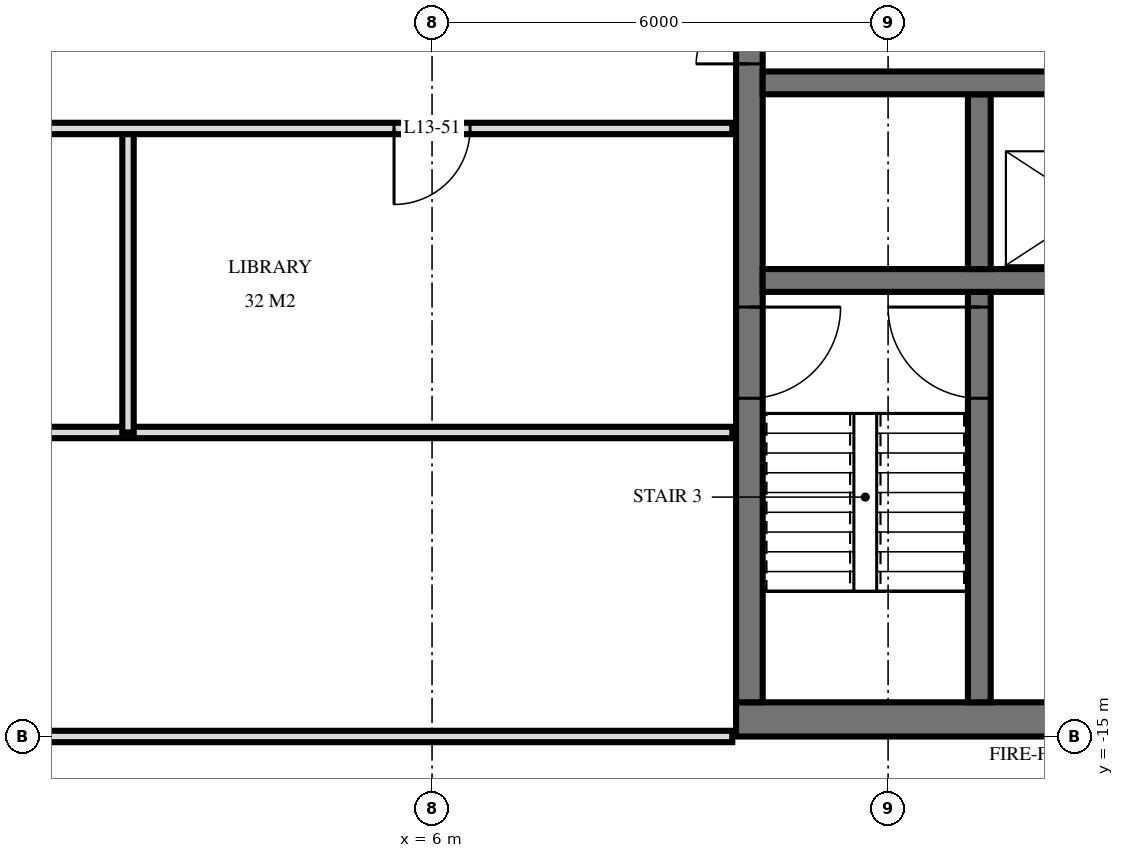
"""IFC4 building model, lengths in metres.
Left out: names, types, materials, properties, quantities, classifications, styles, units other than length and angle.
Written with IfcOpenShell. Run it as: python <this file> out.ifc"""

import sys

from ifc_helpers import new_model, si_unit, direction, frame, frame_2d, origin, place, context, subcontext, project, spatial, rectangle, extrude, element, fill, save


model = new_model("IFC4")
c1 = context("Model", 3, precision=1e-05, world=origin(), true_north=direction((0.0, 1.0)))
c2 = subcontext(c1, "Body", "Model", "MODEL_VIEW")
j1 = project(units=[si_unit("LENGTHUNIT", "METRE"), si_unit("PLANEANGLEUNIT", "RADIAN")], contexts=[c1])
p1 = place(None, origin())
s1 = spatial("IfcSite", under=j1, at=p1, CompositionType="ELEMENT")
p2 = place(p1, origin())
s2 = spatial("IfcBuilding", under=s1, at=p2, CompositionType="ELEMENT")
p3 = place(p2, frame((0.0, 0.0, 56.4)))
s3 = spatial("IfcBuildingStorey", under=s2, at=p3, CompositionType="ELEMENT", Elevation=56.4)
p4 = place(p3, frame((10.0, -14.775, 0.0), z_axis=(0.0, 0.0, 1.0), x_axis=(1.0, 0.0, 0.0)))
e1 = element("IfcWall", 1, at=p4, inside=s3, PredefinedType="SHEAR", context=c2, shape_type="SweptSolid", body=[
    extrude(rectangle(XDim=19.5, YDim=0.45, at=frame_2d((9.75, 0.0))), origin(), (0.0, 0.0, 1.0), 3.6),
])
p5 = place(p4, frame((7.1, 0.0, 0.0)))
e2 = element("IfcOpeningElement", 2, at=p5, cuts=e1, PredefinedType="OPENING", context=c2, shape_type="SweptSolid", body=[
    extrude(rectangle(XDim=1.2, YDim=2.1, at=frame_2d((0.6, 1.05))), frame((0.0, 0.235, 0.0), z_axis=(0.0, -1.0, 0.0), x_axis=(1.0, 0.0, 0.0)), (0.0, 0.0, 1.0), 0.47),
])
p6 = place(p4, frame((4.15, 0.0, 0.0)))
e3 = element("IfcOpeningElement", 3, at=p6, cuts=e1, PredefinedType="OPENING", context=c2, shape_type="SweptSolid", body=[
    extrude(rectangle(XDim=1.1, YDim=2.1, at=frame_2d((0.55, 1.05))), frame((0.0, 0.235, 0.0), z_axis=(0.0, -1.0, 0.0), x_axis=(1.0, 0.0, 0.0)), (0.0, 0.0, 1.0), 0.47),
])
p7 = place(p4, frame((10.1, 0.0, 0.0)))
e4 = element("IfcOpeningElement", 4, at=p7, cuts=e1, PredefinedType="OPENING", context=c2, shape_type="SweptSolid", body=[
    extrude(rectangle(XDim=0.9, YDim=2.1, at=frame_2d((0.45, 1.05))), frame((0.0, 0.235, 0.0), z_axis=(0.0, -1.0, 0.0), x_axis=(1.0, 0.0, 0.0)), (0.0, 0.0, 1.0), 0.47),
])
p8 = place(p4, frame((12.45, 0.0, 0.0)))
e5 = element("IfcOpeningElement", 5, at=p8, cuts=e1, PredefinedType="OPENING", context=c2, shape_type="SweptSolid", body=[
    extrude(rectangle(XDim=1.0, YDim=2.1, at=frame_2d((0.5, 1.05))), frame((0.0, 0.235, 0.0), z_axis=(0.0, -1.0, 0.0), x_axis=(1.0, 0.0, 0.0)), (0.0, 0.0, 1.0), 0.47),
])
p9 = place(p4, frame((15.087, 0.0, 0.0)))
e6 = element("IfcOpeningElement", 6, at=p9, cuts=e1, PredefinedType="OPENING", context=c2, shape_type="SweptSolid", body=[
    extrude(rectangle(XDim=1.0, YDim=2.1, at=frame_2d((0.5, 1.05))), frame((0.0, 0.235, 0.0), z_axis=(0.0, -1.0, 0.0), x_axis=(1.0, 0.0, 0.0)), (0.0, 0.0, 1.0), 0.47),
])
p10 = place(p4, frame((17.413, 0.0, 0.0)))
e7 = element("IfcOpeningElement", 7, at=p10, cuts=e1, PredefinedType="OPENING", context=c2, shape_type="SweptSolid", body=[
    extrude(rectangle(XDim=1.0, YDim=2.1, at=frame_2d((0.5, 1.05))), frame((0.0, 0.235, 0.0), z_axis=(0.0, -1.0, 0.0), x_axis=(1.0, 0.0, 0.0)), (0.0, 0.0, 1.0), 0.47),
])
p11 = place(p3, frame((10.175, -14.55, 0.0), z_axis=(0.0, 0.0, 1.0), x_axis=(0.0, 1.0, 0.0)))
e8 = element("IfcWall", 8, at=p11, inside=s3, PredefinedType="SHEAR", context=c2, shape_type="SweptSolid", body=[
    extrude(rectangle(XDim=14.1, YDim=0.35, at=frame_2d((7.05, 0.0))), origin(), (0.0, 0.0, 1.0), 3.6),
])
p12 = place(p11, frame((8.4, 0.0, 0.0)))
e9 = element("IfcOpeningElement", 9, at=p12, cuts=e8, PredefinedType="OPENING", context=c2, shape_type="SweptSolid", body=[
    extrude(rectangle(XDim=1.4, YDim=2.4, at=frame_2d((0.7, 1.2))), frame((0.0, 0.185, 0.0), z_axis=(0.0, -1.0, 0.0), x_axis=(1.0, 0.0, 0.0)), (0.0, 0.0, 1.0), 0.37),
])
p13 = place(p11, frame((10.0, 0.0, 0.0)))
e10 = element("IfcOpeningElement", 10, at=p13, cuts=e8, PredefinedType="OPENING", context=c2, shape_type="SweptSolid", body=[
    extrude(rectangle(XDim=1.4, YDim=2.4, at=frame_2d((0.7, 1.2))), frame((0.0, 0.185, 0.0), z_axis=(0.0, -1.0, 0.0), x_axis=(1.0, 0.0, 0.0)), (0.0, 0.0, 1.0), 0.37),
])
p14 = place(p11, frame((4.0, 0.0, 0.0)))
e11 = element("IfcOpeningElement", 11, at=p14, cuts=e8, PredefinedType="OPENING", context=c2, shape_type="SweptSolid", body=[
    extrude(rectangle(XDim=1.2, YDim=2.1, at=frame_2d((0.6, 1.05))), frame((0.0, 0.185, 0.0), z_axis=(0.0, -1.0, 0.0), x_axis=(1.0, 0.0, 0.0)), (0.0, 0.0, 1.0), 0.37),
])
p15 = place(p3, frame((10.35, -6.4, 0.0), z_axis=(0.0, 0.0, 1.0), x_axis=(1.0, 0.0, 0.0)))
e12 = element("IfcWall", 12, at=p15, inside=s3, PredefinedType="SHEAR", context=c2, shape_type="SweptSolid", body=[
    extrude(rectangle(XDim=18.7, YDim=0.3, at=frame_2d((9.35, 0.0))), origin(), (0.0, 0.0, 1.0), 3.6),
])
p16 = place(p15, frame((14.65, 0.0, 0.0)))
e13 = element("IfcOpeningElement", 13, at=p16, cuts=e12, PredefinedType="OPENING", context=c2, shape_type="SweptSolid", body=[
    extrude(rectangle(XDim=1.1, YDim=2.1, at=frame_2d((0.55, 1.05))), frame((0.0, 0.16, 0.0), z_axis=(0.0, -1.0, 0.0), x_axis=(1.0, 0.0, 0.0)), (0.0, 0.0, 1.0), 0.32),
])
p17 = place(p15, frame((17.05, 0.0, 0.0)))
e14 = element("IfcOpeningElement", 14, at=p17, cuts=e12, PredefinedType="OPENING", context=c2, shape_type="SweptSolid", body=[
    extrude(rectangle(XDim=1.1, YDim=2.1, at=frame_2d((0.55, 1.05))), frame((0.0, 0.16, 0.0), z_axis=(0.0, -1.0, 0.0), x_axis=(1.0, 0.0, 0.0)), (0.0, 0.0, 1.0), 0.32),
])
p18 = place(p15, frame((6.8, 0.0, 0.0)))
e15 = element("IfcOpeningElement", 15, at=p18, cuts=e12, PredefinedType="OPENING", context=c2, shape_type="SweptSolid", body=[
    extrude(rectangle(XDim=1.1, YDim=2.1, at=frame_2d((0.55, 1.05))), frame((0.0, 0.16, 0.0), z_axis=(0.0, -1.0, 0.0), x_axis=(1.0, 0.0, 0.0)), (0.0, 0.0, 1.0), 0.32),
])
p19 = place(p15, frame((12.1, 0.0, 0.0)))
e16 = element("IfcOpeningElement", 16, at=p19, cuts=e12, PredefinedType="OPENING", context=c2, shape_type="SweptSolid", body=[
    extrude(rectangle(XDim=1.0, YDim=2.1, at=frame_2d((0.5, 1.05))), frame((0.0, 0.16, 0.0), z_axis=(0.0, -1.0, 0.0), x_axis=(1.0, 0.0, 0.0)), (0.0, 0.0, 1.0), 0.32),
])
p20 = place(p3, frame((10.35, -9.0, 0.0), z_axis=(0.0, 0.0, 1.0), x_axis=(1.0, 0.0, 0.0)))
e17 = element("IfcWall", 17, at=p20, inside=s3, PredefinedType="SHEAR", context=c2, shape_type="SweptSolid", body=[
    extrude(rectangle(XDim=18.7, YDim=0.3, at=frame_2d((9.35, 0.0))), origin(), (0.0, 0.0, 1.0), 3.6),
])
p21 = place(p20, frame((3.8, 0.0, 0.0)))
e18 = element("IfcOpeningElement", 18, at=p21, cuts=e17, PredefinedType="OPENING", context=c2, shape_type="SweptSolid", body=[
    extrude(rectangle(XDim=1.1, YDim=2.1, at=frame_2d((0.55, 1.05))), frame((0.0, 0.16, 0.0), z_axis=(0.0, -1.0, 0.0), x_axis=(1.0, 0.0, 0.0)), (0.0, 0.0, 1.0), 0.32),
])
p22 = place(p3, frame((13.2, -8.85, 0.0), z_axis=(0.0, 0.0, 1.0), x_axis=(0.0, 1.0, 0.0)))
e19 = element("IfcWall", 19, at=p22, inside=s3, PredefinedType="SHEAR", context=c2, shape_type="SweptSolid", body=[
    extrude(rectangle(XDim=2.3, YDim=0.3, at=frame_2d((1.15, 0.0))), origin(), (0.0, 0.0, 1.0), 3.6),
])
p23 = place(p3, frame((13.2, -14.55, 0.0), z_axis=(0.0, 0.0, 1.0), x_axis=(0.0, 1.0, 0.0)))
e20 = element("IfcWall", 20, at=p23, inside=s3, PredefinedType="SHEAR", context=c2, shape_type="SweptSolid", body=[
    extrude(rectangle(XDim=5.4, YDim=0.3, at=frame_2d((2.7, 0.0))), origin(), (0.0, 0.0, 1.0), 3.6),
])
p24 = place(p23, frame((4.0, 0.0, 0.0)))
e21 = element("IfcOpeningElement", 21, at=p24, cuts=e20, PredefinedType="OPENING", context=c2, shape_type="SweptSolid", body=[
    extrude(rectangle(XDim=1.2, YDim=2.1, at=frame_2d((0.6, 1.05))), frame((0.0, 0.16, 0.0), z_axis=(0.0, -1.0, 0.0), x_axis=(1.0, 0.0, 0.0)), (0.0, 0.0, 1.0), 0.32),
])
p25 = place(p3, frame((2.0, -11.0, 0.0), z_axis=(0.0, 0.0, 1.0), x_axis=(0.0, 1.0, 0.0)))
e22 = element("IfcWall", 22, at=p25, inside=s3, PredefinedType="PARTITIONING", context=c2, shape_type="SweptSolid", body=[
    extrude(rectangle(XDim=4.0, YDim=0.15, at=frame_2d((2.0, 0.0))), origin(), (0.0, 0.0, 1.0), 3.32),
])
p26 = place(p3, frame((-9.95, -15.0, 0.0), z_axis=(0.0, 0.0, 1.0), x_axis=(1.0, 0.0, 0.0)))
e23 = element("IfcWall", 23, at=p26, inside=s3, PredefinedType="PARTITIONING", context=c2, shape_type="SweptSolid", body=[
    extrude(rectangle(XDim=19.9, YDim=0.15, at=frame_2d((9.95, 0.0))), origin(), (0.0, 0.0, 1.0), 2.684),
])
p27 = place(p26, frame((9.45, 0.0, 0.0)))
e24 = element("IfcOpeningElement", 24, at=p27, cuts=e23, PredefinedType="OPENING", context=c2, shape_type="SweptSolid", body=[
    extrude(rectangle(XDim=1.0, YDim=2.1, at=frame_2d((0.5, 1.05))), frame((0.0, 0.085, 0.0), z_axis=(0.0, -1.0, 0.0), x_axis=(1.0, 0.0, 0.0)), (0.0, 0.0, 1.0), 0.17),
])
p28 = place(p3, frame((-9.95, -11.0, 0.0), z_axis=(0.0, 0.0, 1.0), x_axis=(1.0, 0.0, 0.0)))
e25 = element("IfcWall", 25, at=p28, inside=s3, PredefinedType="PARTITIONING", context=c2, shape_type="SweptSolid", body=[
    extrude(rectangle(XDim=19.9, YDim=0.15, at=frame_2d((9.95, 0.0))), origin(), (0.0, 0.0, 1.0), 3.32),
])
p29 = place(p28, frame((9.45, 0.0, 0.0)))
e26 = element("IfcOpeningElement", 26, at=p29, cuts=e25, PredefinedType="OPENING", context=c2, shape_type="SweptSolid", body=[
    extrude(rectangle(XDim=1.0, YDim=2.1, at=frame_2d((0.5, 1.05))), frame((0.0, 0.085, 0.0), z_axis=(0.0, -1.0, 0.0), x_axis=(1.0, 0.0, 0.0)), (0.0, 0.0, 1.0), 0.17),
])
p30 = place(p28, frame((3.45, 0.0, 0.0)))
e27 = element("IfcOpeningElement", 27, at=p30, cuts=e25, PredefinedType="OPENING", context=c2, shape_type="SweptSolid", body=[
    extrude(rectangle(XDim=1.0, YDim=2.1, at=frame_2d((0.5, 1.05))), frame((0.0, 0.085, 0.0), z_axis=(0.0, -1.0, 0.0), x_axis=(1.0, 0.0, 0.0)), (0.0, 0.0, 1.0), 0.17),
])
p31 = place(p3, frame((-9.95, -7.0, 0.0), z_axis=(0.0, 0.0, 1.0), x_axis=(1.0, 0.0, 0.0)))
e28 = element("IfcWall", 28, at=p31, inside=s3, PredefinedType="PARTITIONING", context=c2, shape_type="SweptSolid", body=[
    extrude(rectangle(XDim=19.9, YDim=0.15, at=frame_2d((9.95, 0.0))), origin(), (0.0, 0.0, 1.0), 3.32),
])
p32 = place(p31, frame((9.45, 0.0, 0.0)))
e29 = element("IfcOpeningElement", 29, at=p32, cuts=e28, PredefinedType="OPENING", context=c2, shape_type="SweptSolid", body=[
    extrude(rectangle(XDim=1.0, YDim=2.1, at=frame_2d((0.5, 1.05))), frame((0.0, 0.085, 0.0), z_axis=(0.0, -1.0, 0.0), x_axis=(1.0, 0.0, 0.0)), (0.0, 0.0, 1.0), 0.17),
])
p33 = place(p31, frame((15.45, 0.0, 0.0)))
e30 = element("IfcOpeningElement", 30, at=p33, cuts=e28, PredefinedType="OPENING", context=c2, shape_type="SweptSolid", body=[
    extrude(rectangle(XDim=1.0, YDim=2.1, at=frame_2d((0.5, 1.05))), frame((0.0, 0.085, 0.0), z_axis=(0.0, -1.0, 0.0), x_axis=(1.0, 0.0, 0.0)), (0.0, 0.0, 1.0), 0.17),
])
p34 = place(p12, origin())
e31 = element("IfcDoor", 31, at=p34, inside=s3, OperationType="DOUBLE_DOOR_SINGLE_SWING", PredefinedType="DOOR", context=c2, shape_type="SweptSolid", body=[
    extrude(rectangle(XDim=1.4, YDim=2.4, at=frame_2d((0.7, 1.2))), frame((0.0, 0.025, 0.0), z_axis=(0.0, -1.0, 0.0), x_axis=(1.0, 0.0, 0.0)), (0.0, 0.0, 1.0), 0.05),
])
fill(e9, e31)
p35 = place(p14, frame((0.6, 0.0, 0.0), z_axis=(0.0, 0.0, 1.0), x_axis=(-1.0, 0.0, 0.0)))
e32 = element("IfcDoor", 32, at=p35, inside=s3, OperationType="SINGLE_SWING_RIGHT", PredefinedType="DOOR", context=c2, shape_type="SweptSolid", body=[
    extrude(rectangle(XDim=1.2, YDim=2.1, at=frame_2d((0.0, 1.05))), frame((0.0, -0.025, 0.0), z_axis=(0.0, 1.0, 0.0), x_axis=(-1.0, 0.0, 0.0)), (0.0, 0.0, 1.0), 0.05),
])
fill(e11, e32)
p36 = place(p24, origin())
e33 = element("IfcDoor", 33, at=p36, inside=s3, OperationType="SINGLE_SWING_LEFT", PredefinedType="DOOR", context=c2, shape_type="SweptSolid", body=[
    extrude(rectangle(XDim=1.2, YDim=2.1, at=frame_2d((0.6, 1.05))), frame((0.0, 0.025, 0.0), z_axis=(0.0, -1.0, 0.0), x_axis=(1.0, 0.0, 0.0)), (0.0, 0.0, 1.0), 0.05),
])
fill(e21, e33)
p37 = place(p33, frame((0.5, 0.0, 0.0), z_axis=(0.0, 0.0, 1.0), x_axis=(-1.0, 0.0, 0.0)))
e34 = element("IfcDoor", 34, at=p37, inside=s3, OperationType="SINGLE_SWING_LEFT", PredefinedType="DOOR", context=c2, shape_type="SweptSolid", body=[
    extrude(rectangle(XDim=1.0, YDim=2.1, at=frame_2d((0.0, 1.05))), frame((0.0, -0.025, 0.0), z_axis=(0.0, 1.0, 0.0), x_axis=(-1.0, 0.0, 0.0)), (0.0, 0.0, 1.0), 0.05),
])
fill(e30, e34)
save(model, sys.argv[1])
